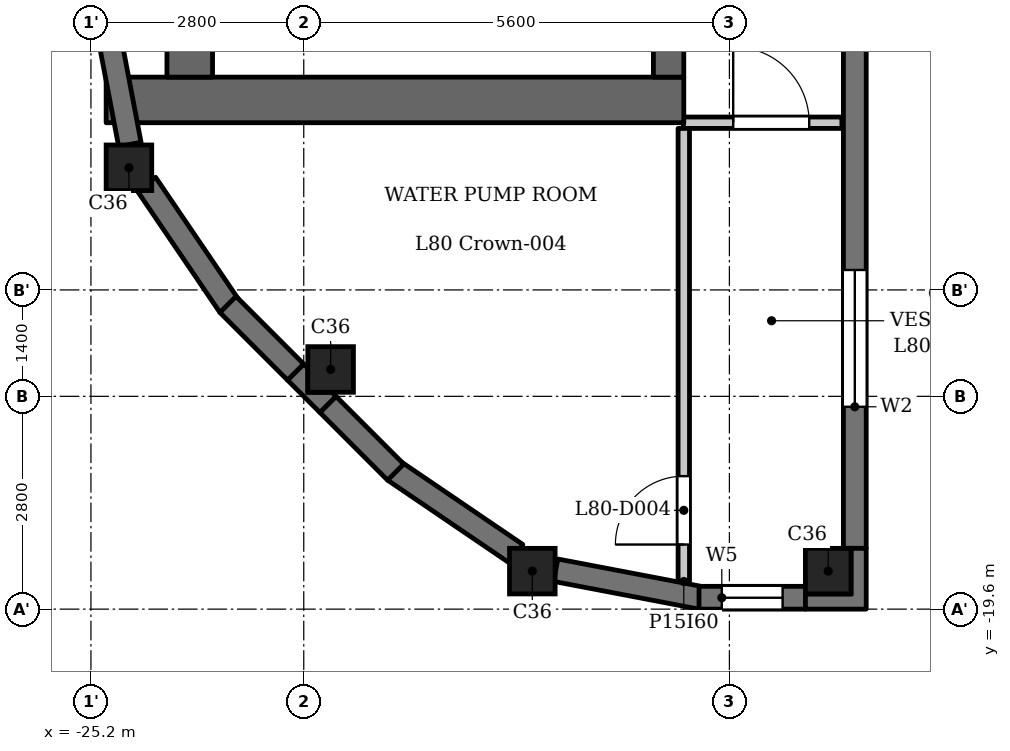
"""IFC4 building model, lengths in metres.
Left out: names, types, materials, properties, quantities, classifications, styles, units other than length and angle.
Written with IfcOpenShell. Run it as: python <this file> out.ifc"""

import sys

from ifc_helpers import new_model, si_unit, direction, frame, frame_2d, origin, origin_2d, place, context, subcontext, project, spatial, polyline, rectangle, outline, extrude, element, fill, save


model = new_model("IFC4")
c1 = context("Model", 3, precision=1e-05, world=origin(), true_north=direction((0.0, 1.0)))
c2 = subcontext(c1, "Body", "Model", "MODEL_VIEW")
j1 = project(units=[si_unit("LENGTHUNIT", "METRE"), si_unit("PLANEANGLEUNIT", "RADIAN")], contexts=[c1])
p1 = place(None, origin())
s1 = spatial("IfcSite", under=j1, at=p1, CompositionType="ELEMENT")
p2 = place(p1, origin())
s2 = spatial("IfcBuilding", under=s1, at=p2, CompositionType="ELEMENT")
p3 = place(p2, frame((0.0, 0.0, 310.4)))
s3 = spatial("IfcBuildingStorey", under=s2, at=p3, CompositionType="ELEMENT", Elevation=310.4)
for number, where, z_axis, x_axis in (
    (1, (-24.7, -13.793, 0.0), (0.0, 0.0, 1.0), (1.0, 0.0, 0.0)),
    (2, (-22.046, -16.446, 0.0), (0.0, 0.0, 1.0), (1.0, 0.0, 0.0)),
    (3, (-19.393, -19.1, 0.0), (0.0, 0.0, 1.0), (1.0, 0.0, 0.0)),
    (4, (-15.5, -19.1, 0.0), (0.0, 0.0, 1.0), (1.0, 0.0, 0.0)),
):
    element("IfcColumn", number, at=place(p3, frame(where, z_axis=z_axis, x_axis=x_axis)), inside=s3, PredefinedType="COLUMN", context=c2, shape_type="SweptSolid", body=[
        extrude(rectangle(XDim=0.6, YDim=0.6, at=origin_2d()), origin(), (0.0, 0.0, 1.0), 3.5),
    ])
for number, where, z_axis, x_axis in (
    (5, (-21.213, -17.779, 0.0), (0.0, 0.0, 1.0), (0.827, -0.562, 0.0)),
    (6, (-19.085, -19.088, 0.0), (0.0, 0.0, 1.0), (0.982, -0.187, 0.0)),
):
    element("IfcWall", number, at=place(p3, frame(where, z_axis=z_axis, x_axis=x_axis)), inside=s3, PredefinedType="SOLIDWALL", context=c2, shape_type="SweptSolid", body=[
        extrude(rectangle(XDim=1.948, YDim=0.3, at=frame_2d((0.974, 0.0))), origin(), (0.0, 0.0, 1.0), 2.2),
    ])
p4 = place(p3, frame((-17.2, -19.45, 0.0), z_axis=(0.0, 0.0, 1.0), x_axis=(1.0, 0.0, 0.0)))
e7 = element("IfcWall", 7, at=p4, inside=s3, PredefinedType="SOLIDWALL", context=c2, shape_type="SweptSolid", body=[
    extrude(rectangle(XDim=1.4, YDim=0.3, at=frame_2d((0.7, 0.0))), origin(), (0.0, 0.0, 1.0), 2.8),
])
p5 = place(p4, frame((0.3, 0.0, 0.6)))
e8 = element("IfcOpeningElement", 8, at=p5, cuts=e7, PredefinedType="OPENING", context=c2, shape_type="SweptSolid", body=[
    extrude(rectangle(XDim=0.8, YDim=1.55, at=frame_2d((0.4, 0.775))), frame((0.0, 0.16, 0.0), z_axis=(0.0, -1.0, 0.0), x_axis=(1.0, 0.0, 0.0)), (0.0, 0.0, 1.0), 0.32),
])
p6 = place(p3, frame((-15.15, -18.8, 0.0), z_axis=(0.0, 0.0, 1.0), x_axis=(0.0, 1.0, 0.0)))
e9 = element("IfcWall", 9, at=p6, inside=s3, PredefinedType="SOLIDWALL", context=c2, shape_type="SweptSolid", body=[
    extrude(rectangle(XDim=7.3, YDim=0.3, at=frame_2d((3.65, 0.0))), origin(), (0.0, 0.0, 1.0), 2.8),
])
p7 = place(p6, frame((1.863, 0.0, 0.9)))
e10 = element("IfcOpeningElement", 10, at=p7, cuts=e9, PredefinedType="OPENING", context=c2, shape_type="SweptSolid", body=[
    extrude(rectangle(XDim=1.8, YDim=1.25, at=frame_2d((0.9, 0.625))), frame((0.0, 0.16, 0.0), z_axis=(0.0, -1.0, 0.0), x_axis=(1.0, 0.0, 0.0)), (0.0, 0.0, 1.0), 0.32),
])
p8 = place(p3, frame((-25.052, -11.573, 0.0), z_axis=(0.0, 0.0, 1.0), x_axis=(0.187354129902, -0.982292436095, 0.0)))
e11 = element("IfcWall", 11, at=p8, inside=s3, PredefinedType="SOLIDWALL", context=c2, shape_type="SweptSolid", body=[
    extrude(rectangle(XDim=1.947, YDim=0.3, at=frame_2d((0.973, 0.0))), origin(), (0.0, 0.0, 1.0), 2.2),
])
p9 = place(p3, frame((-24.474, -14.002, 0.0), z_axis=(0.0, 0.0, 1.0), x_axis=(0.562025435703, -0.827119948752, 0.0)))
e12 = element("IfcWall", 12, at=p9, inside=s3, PredefinedType="SOLIDWALL", context=c2, shape_type="SweptSolid", body=[
    extrude(rectangle(XDim=1.948, YDim=0.3, at=frame_2d((0.974, 0.0))), origin(), (0.0, 0.0, 1.0), 2.2),
])
for number, where, z_axis, x_axis in (
    (13, (-23.397, -15.591, 0.0), (0.0, 0.0, 1.0), (0.707, -0.707, 0.0)),
    (14, (-22.082, -16.906, 0.0), (0.0, 0.0, 1.0), (0.707, -0.707, 0.0)),
):
    element("IfcWall", number, at=place(p3, frame(where, z_axis=z_axis, x_axis=x_axis)), inside=s3, PredefinedType="SOLIDWALL", context=c2, shape_type="SweptSolid", body=[
        extrude(rectangle(XDim=1.26, YDim=0.3, at=frame_2d((0.63, 0.0))), origin(), (0.0, 0.0, 1.0), 2.8),
    ])
p10 = place(p3, frame((-17.4, -12.9, 0.0), z_axis=(0.0, 0.0, 1.0), x_axis=(-1.0, 0.0, 0.0)))
e15 = element("IfcWall", 15, at=p10, inside=s3, PredefinedType="SHEAR", context=c2, shape_type="SweptSolid", body=[
    extrude(rectangle(XDim=7.6, YDim=0.6, at=frame_2d((3.8, 0.0))), origin(), (0.0, 0.0, 1.0), 2.8),
])
p11 = place(p3, frame((-17.6, -12.6, 0.0), z_axis=(0.0, 0.0, 1.0), x_axis=(0.0, 1.0, 0.0)))
e16 = element("IfcWall", 16, at=p11, inside=s3, PredefinedType="SHEAR", context=c2, shape_type="SweptSolid", body=[
    extrude(rectangle(XDim=25.2, YDim=0.4, at=frame_2d((12.6, 0.0))), origin(), (0.0, 0.0, 1.0), 2.8),
])
p12 = place(p11, frame((6.475, 0.0, 0.0)))
e17 = element("IfcOpeningElement", 17, at=p12, cuts=e16, PredefinedType="OPENING", context=c2, shape_type="SweptSolid", body=[
    extrude(rectangle(XDim=0.9, YDim=2.1, at=frame_2d((0.45, 1.05))), frame((0.0, 0.21, 0.0), z_axis=(0.0, -1.0, 0.0), x_axis=(1.0, 0.0, 0.0)), (0.0, 0.0, 1.0), 0.42),
])
p13 = place(p11, frame((10.075, 0.0, 0.0)))
e18 = element("IfcOpeningElement", 18, at=p13, cuts=e16, PredefinedType="OPENING", context=c2, shape_type="SweptSolid", body=[
    extrude(rectangle(XDim=0.9, YDim=2.1, at=frame_2d((0.45, 1.05))), frame((0.0, 0.21, 0.0), z_axis=(0.0, -1.0, 0.0), x_axis=(1.0, 0.0, 0.0)), (0.0, 0.0, 1.0), 0.42),
])
p14 = place(p11, frame((17.05, 0.0, 0.0)))
e19 = element("IfcOpeningElement", 19, at=p14, cuts=e16, PredefinedType="OPENING", context=c2, shape_type="SweptSolid", body=[
    extrude(rectangle(XDim=0.9, YDim=2.1, at=frame_2d((0.45, 1.05))), frame((0.0, 0.21, 0.0), z_axis=(0.0, -1.0, 0.0), x_axis=(1.0, 0.0, 0.0)), (0.0, 0.0, 1.0), 0.42),
])
p15 = place(p11, frame((23.25, 0.0, 0.0)))
e20 = element("IfcOpeningElement", 20, at=p15, cuts=e16, PredefinedType="OPENING", context=c2, shape_type="SweptSolid", body=[
    extrude(rectangle(XDim=1.1, YDim=2.1, at=frame_2d((0.55, 1.05))), frame((0.0, 0.21, 0.0), z_axis=(0.0, -1.0, 0.0), x_axis=(1.0, 0.0, 0.0)), (0.0, 0.0, 1.0), 0.42),
])
p16 = place(p11, frame((0.85, 0.0, 0.0)))
e21 = element("IfcOpeningElement", 21, at=p16, cuts=e16, PredefinedType="OPENING", context=c2, shape_type="SweptSolid", body=[
    extrude(rectangle(XDim=1.1, YDim=2.1, at=frame_2d((0.55, 1.05))), frame((0.0, 0.21, 0.0), z_axis=(0.0, -1.0, 0.0), x_axis=(1.0, 0.0, 0.0)), (0.0, 0.0, 1.0), 0.42),
])
p17 = place(p11, frame((13.075, 0.0, 0.0)))
e22 = element("IfcOpeningElement", 22, at=p17, cuts=e16, PredefinedType="OPENING", context=c2, shape_type="SweptSolid", body=[
    extrude(rectangle(XDim=1.8, YDim=2.1, at=frame_2d((0.9, 1.05))), frame((0.0, 0.21, 0.0), z_axis=(0.0, -1.0, 0.0), x_axis=(1.0, 0.0, 0.0)), (0.0, 0.0, 1.0), 0.42),
])
p18 = place(p3, frame((-23.9, -12.6, 0.0), z_axis=(0.0, 0.0, 1.0), x_axis=(0.0, 1.0, 0.0)))
e23 = element("IfcWall", 23, at=p18, inside=s3, PredefinedType="SHEAR", context=c2, shape_type="SweptSolid", body=[
    extrude(rectangle(XDim=25.2, YDim=0.6, at=frame_2d((12.6, 0.0))), origin(), (0.0, 0.0, 1.0), 2.8),
])
p19 = place(p3, frame((-17.405, -13.2, 0.0), z_axis=(0.0, 0.0, 1.0), x_axis=(1.0, 0.0, 0.0)))
e24 = element("IfcWall", 24, at=p19, inside=s3, PredefinedType="PARTITIONING", context=c2, shape_type="SweptSolid", body=[
    extrude(rectangle(XDim=2.085, YDim=0.15, at=frame_2d((1.042, 0.0))), origin(), (0.0, 0.0, 1.0), 2.8),
])
p20 = place(p19, frame((0.655, 0.0, 0.0)))
e25 = element("IfcOpeningElement", 25, at=p20, cuts=e24, PredefinedType="OPENING", context=c2, shape_type="SweptSolid", body=[
    extrude(rectangle(XDim=1.0, YDim=2.1, at=frame_2d((0.5, 1.05))), frame((0.0, 0.085, 0.0), z_axis=(0.0, -1.0, 0.0), x_axis=(1.0, 0.0, 0.0)), (0.0, 0.0, 1.0), 0.17),
])
p21 = place(p3, frame((-17.4, -19.236, 0.0), z_axis=(0.0, 0.0, 1.0), x_axis=(0.0, 1.0, 0.0)))
e26 = element("IfcWall", 26, at=p21, inside=s3, PredefinedType="PARTITIONING", context=c2, shape_type="SweptSolid", body=[
    extrude(rectangle(XDim=5.961, YDim=0.15, at=frame_2d((2.981, 0.0))), origin(), (0.0, 0.0, 1.0), 2.8),
])
p22 = place(p21, frame((0.486, 0.0, 0.0)))
e27 = element("IfcOpeningElement", 27, at=p22, cuts=e26, PredefinedType="OPENING", context=c2, shape_type="SweptSolid", body=[
    extrude(rectangle(XDim=0.9, YDim=2.1, at=frame_2d((0.45, 1.05))), frame((0.0, 0.085, 0.0), z_axis=(0.0, -1.0, 0.0), x_axis=(1.0, 0.0, 0.0)), (0.0, 0.0, 1.0), 0.17),
])
p23 = place(p3, origin())
e28 = element("IfcWall", 28, at=p23, inside=s3, PredefinedType="SOLIDWALL", context=c2, shape_type="SweptSolid", body=[
    extrude(outline(polyline([(-15.8, -19.6), (-15.0, -19.6), (-15.0, -18.8), (-15.2, -18.8), (-15.2, -19.4), (-15.8, -19.4), (-15.8, -19.6)])), origin(), (0.0, 0.0, 1.0), 2.8),
])
e29 = element("IfcWall", 29, at=p23, inside=s3, PredefinedType="SOLIDWALL", context=c2, shape_type="SweptSolid", body=[
    extrude(outline(polyline([(-22.4, -16.376), (-22.612, -16.588), (-22.188, -17.012), (-21.976, -16.8), (-22.029, -16.746), (-22.346, -16.746), (-22.346, -16.429), (-22.4, -16.376)])), origin(), (0.0, 0.0, 1.0), 2.8),
])
p24 = place(p20, origin())
e30 = element("IfcDoor", 30, at=p24, inside=s3, OperationType="SINGLE_SWING_RIGHT", PredefinedType="DOOR", context=c2, shape_type="SweptSolid", body=[
    extrude(rectangle(XDim=1.0, YDim=2.1, at=frame_2d((0.5, 1.05))), frame((0.0, 0.025, 0.0), z_axis=(0.0, -1.0, 0.0), x_axis=(1.0, 0.0, 0.0)), (0.0, 0.0, 1.0), 0.05),
])
fill(e25, e30)
p25 = place(p22, origin())
e31 = element("IfcDoor", 31, at=p25, inside=s3, OperationType="SINGLE_SWING_RIGHT", PredefinedType="DOOR", context=c2, shape_type="SweptSolid", body=[
    extrude(rectangle(XDim=0.9, YDim=2.1, at=frame_2d((0.45, 1.05))), frame((0.0, 0.025, 0.0), z_axis=(0.0, -1.0, 0.0), x_axis=(1.0, 0.0, 0.0)), (0.0, 0.0, 1.0), 0.05),
])
fill(e27, e31)
p26 = place(p5, origin())
e32 = element("IfcWindow", 32, at=p26, inside=s3, PartitioningType="SINGLE_PANEL", PredefinedType="WINDOW", context=c2, shape_type="SweptSolid", body=[
    extrude(rectangle(XDim=0.8, YDim=1.55, at=frame_2d((0.4, 0.775))), frame((0.0, 0.03, 0.0), z_axis=(0.0, -1.0, 0.0), x_axis=(1.0, 0.0, 0.0)), (0.0, 0.0, 1.0), 0.06),
])
fill(e8, e32)
p27 = place(p7, origin())
e33 = element("IfcWindow", 33, at=p27, inside=s3, PartitioningType="SINGLE_PANEL", PredefinedType="WINDOW", context=c2, shape_type="SweptSolid", body=[
    extrude(rectangle(XDim=1.8, YDim=1.25, at=frame_2d((0.9, 0.625))), frame((0.0, 0.03, 0.0), z_axis=(0.0, -1.0, 0.0), x_axis=(1.0, 0.0, 0.0)), (0.0, 0.0, 1.0), 0.06),
])
fill(e10, e33)
save(model, sys.argv[1])
